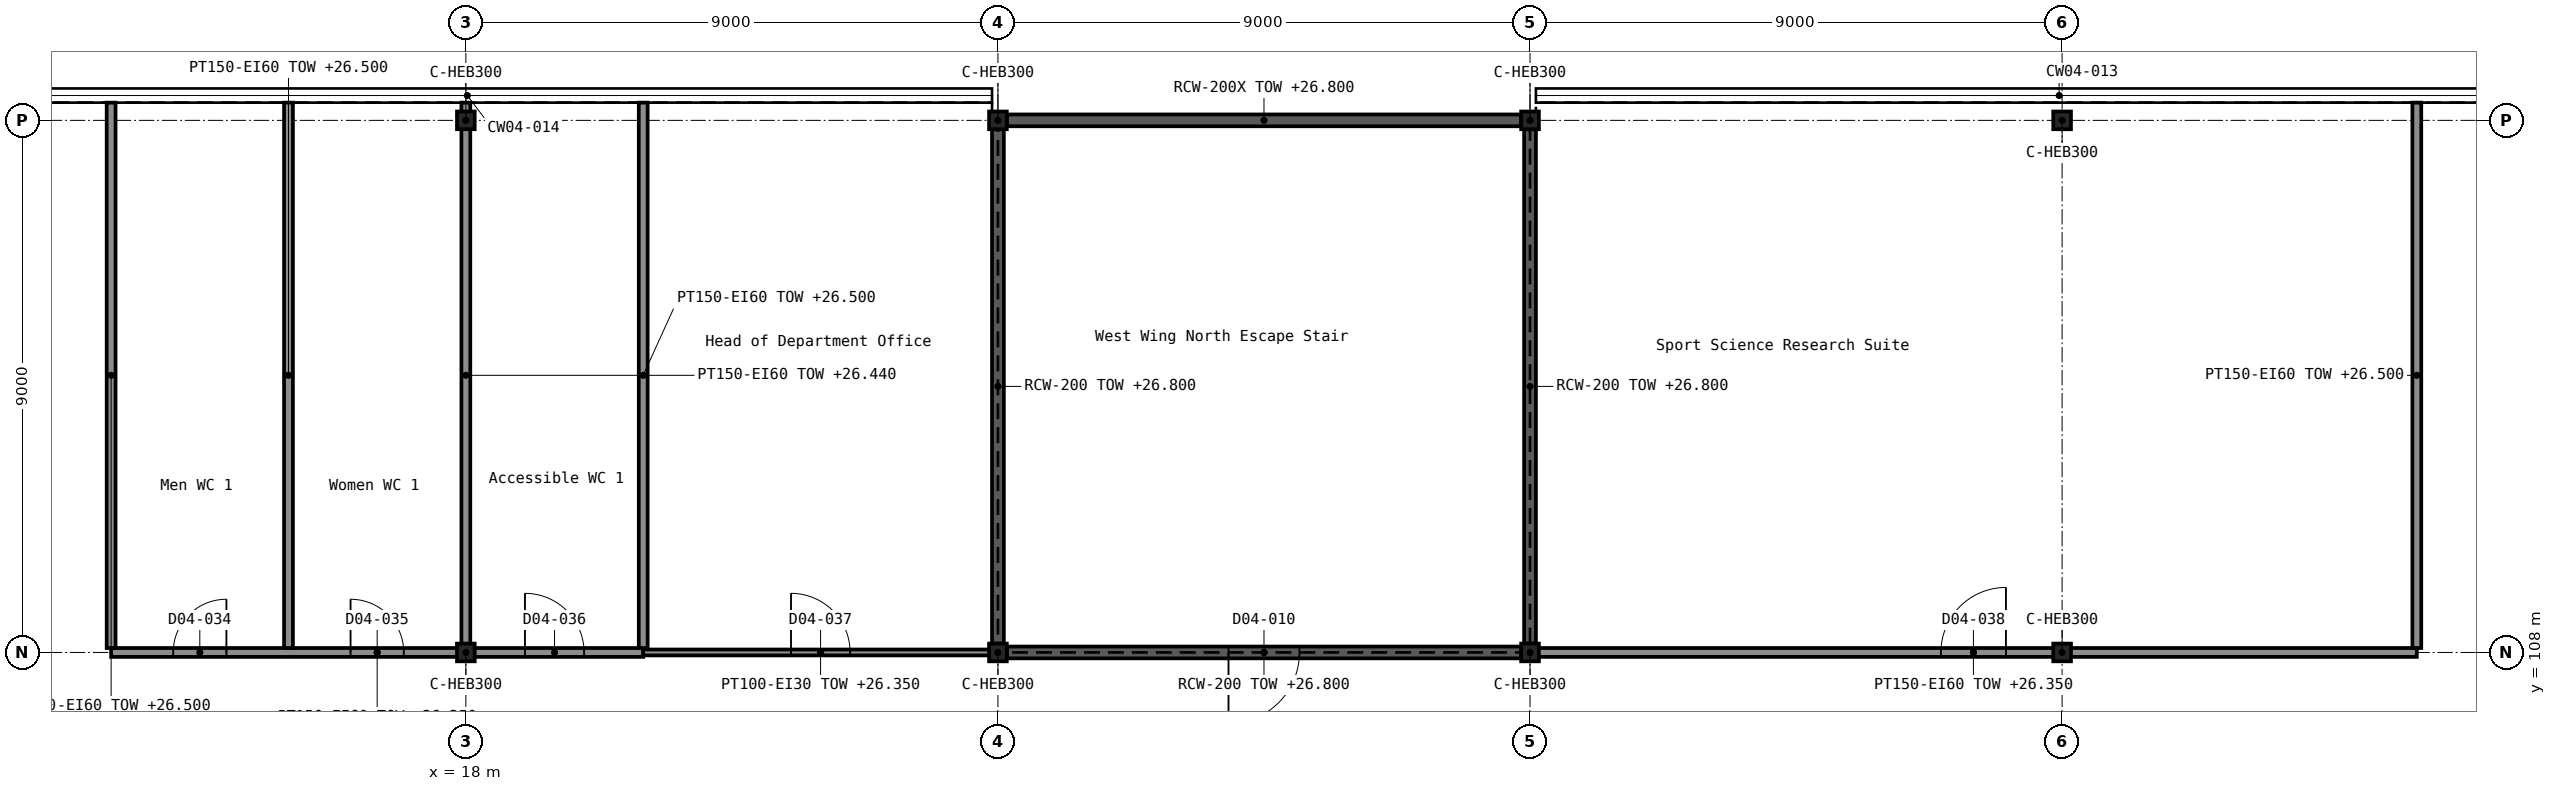
"""IFC4 building model, lengths in metres.
Left out: names, types, materials, properties, quantities, classifications, styles, units other than length and angle.
Written with IfcOpenShell. Run it as: python <this file> out.ifc"""

import sys

from ifc_helpers import new_model, si_unit, direction, frame, frame_2d, origin, origin_2d, place, context, subcontext, project, spatial, rectangle, i_section, extrude, element, fill, save


model = new_model("IFC4")
c1 = context("Model", 3, precision=1e-05, world=origin(), true_north=direction((0.0, 1.0)))
c2 = subcontext(c1, "Body", "Model", "MODEL_VIEW")
j1 = project(units=[si_unit("LENGTHUNIT", "METRE"), si_unit("PLANEANGLEUNIT", "RADIAN")], contexts=[c1])
p1 = place(None, origin())
s1 = spatial("IfcSite", under=j1, at=p1, CompositionType="ELEMENT")
p2 = place(p1, origin())
s2 = spatial("IfcBuilding", under=s1, at=p2, CompositionType="ELEMENT")
p3 = place(p2, frame((0.0, 0.0, 21.6)))
s3 = spatial("IfcBuildingStorey", under=s2, at=p3, CompositionType="ELEMENT", Elevation=21.6)
for number, where, z_axis, x_axis in (
    (1, (18.0, 108.0, 0.0), (0.0, 0.0, 1.0), (1.0, 0.0, 0.0)),
    (2, (27.0, 108.0, 0.0), (0.0, 0.0, 1.0), (1.0, 0.0, 0.0)),
    (3, (36.0, 108.0, 0.0), (0.0, 0.0, 1.0), (1.0, 0.0, 0.0)),
    (4, (45.0, 108.0, 0.0), (0.0, 0.0, 1.0), (1.0, 0.0, 0.0)),
    (5, (18.0, 117.0, 0.0), (0.0, 0.0, 1.0), (1.0, 0.0, 0.0)),
    (6, (27.0, 117.0, 0.0), (0.0, 0.0, 1.0), (1.0, 0.0, 0.0)),
    (7, (36.0, 117.0, 0.0), (0.0, 0.0, 1.0), (1.0, 0.0, 0.0)),
    (8, (45.0, 117.0, 0.0), (0.0, 0.0, 1.0), (1.0, 0.0, 0.0)),
):
    element("IfcColumn", number, at=place(p3, frame(where, z_axis=z_axis, x_axis=x_axis)), inside=s3, PredefinedType="COLUMN", context=c2, shape_type="SweptSolid", body=[
        extrude(i_section(OverallWidth=0.3, OverallDepth=0.3, WebThickness=0.011, FlangeThickness=0.019, FilletRadius=0.027, at=origin_2d()), origin(), (0.0, 0.0, 1.0), 5.4),
    ])
p4 = place(p3, frame((27.15, 108.0, 0.0), z_axis=(0.0, 0.0, 1.0), x_axis=(1.0, 0.0, 0.0)))
e9 = element("IfcWall", 9, at=p4, inside=s3, PredefinedType="SHEAR", context=c2, shape_type="SweptSolid", body=[
    extrude(rectangle(XDim=8.7, YDim=0.2, at=frame_2d((4.35, 0.0))), origin(), (0.0, 0.0, 1.0), 5.2),
])
p5 = place(p4, frame((3.75, 0.0, 0.0)))
e10 = element("IfcOpeningElement", 10, at=p5, cuts=e9, PredefinedType="OPENING", context=c2, shape_type="SweptSolid", body=[
    extrude(rectangle(XDim=1.2, YDim=2.1, at=frame_2d((0.6, 1.05))), frame((0.0, 0.111, 0.0), z_axis=(0.0, -1.0, 0.0), x_axis=(1.0, 0.0, 0.0)), (0.0, 0.0, 1.0), 0.222),
])
for number, where, z_axis, x_axis in (
    (11, (27.15, 117.0, 0.0), (0.0, 0.0, 1.0), (1.0, 0.0, 0.0)),
    (12, (27.0, 108.15, 0.0), (0.0, 0.0, 1.0), (0.0, 1.0, 0.0)),
    (13, (36.0, 108.15, 0.0), (0.0, 0.0, 1.0), (0.0, 1.0, 0.0)),
):
    element("IfcWall", number, at=place(p3, frame(where, z_axis=z_axis, x_axis=x_axis)), inside=s3, PredefinedType="SHEAR", context=c2, shape_type="SweptSolid", body=[
        extrude(rectangle(XDim=8.7, YDim=0.2, at=frame_2d((4.35, 0.0))), origin(), (0.0, 0.0, 1.0), 5.2),
    ])
p6 = place(p3, frame((12.0, 108.0, 0.0), z_axis=(0.0, 0.0, 1.0), x_axis=(1.0, 0.0, 0.0)))
e14 = element("IfcWall", 14, at=p6, inside=s3, PredefinedType="PARTITIONING", context=c2, shape_type="SweptSolid", body=[
    extrude(rectangle(XDim=9.0, YDim=0.15, at=frame_2d((4.5, 0.0))), origin(), (0.0, 0.0, 1.0), 4.75),
])
p7 = place(p6, frame((1.05, 0.0, 0.0)))
e15 = element("IfcOpeningElement", 15, at=p7, cuts=e14, PredefinedType="OPENING", context=c2, shape_type="SweptSolid", body=[
    extrude(rectangle(XDim=0.9, YDim=2.1, at=frame_2d((0.45, 1.05))), frame((0.0, 0.086, 0.0), z_axis=(0.0, -1.0, 0.0), x_axis=(1.0, 0.0, 0.0)), (0.0, 0.0, 1.0), 0.172),
])
p8 = place(p6, frame((4.05, 0.0, 0.0)))
e16 = element("IfcOpeningElement", 16, at=p8, cuts=e14, PredefinedType="OPENING", context=c2, shape_type="SweptSolid", body=[
    extrude(rectangle(XDim=0.9, YDim=2.1, at=frame_2d((0.45, 1.05))), frame((0.0, 0.086, 0.0), z_axis=(0.0, -1.0, 0.0), x_axis=(1.0, 0.0, 0.0)), (0.0, 0.0, 1.0), 0.172),
])
p9 = place(p6, frame((7.0, 0.0, 0.0)))
e17 = element("IfcOpeningElement", 17, at=p9, cuts=e14, PredefinedType="OPENING", context=c2, shape_type="SweptSolid", body=[
    extrude(rectangle(XDim=1.0, YDim=2.1, at=frame_2d((0.5, 1.05))), frame((0.0, 0.086, 0.0), z_axis=(0.0, -1.0, 0.0), x_axis=(1.0, 0.0, 0.0)), (0.0, 0.0, 1.0), 0.172),
])
p10 = place(p3, frame((36.0, 108.0, 0.0), z_axis=(0.0, 0.0, 1.0), x_axis=(1.0, 0.0, 0.0)))
e18 = element("IfcWall", 18, at=p10, inside=s3, PredefinedType="PARTITIONING", context=c2, shape_type="SweptSolid", body=[
    extrude(rectangle(XDim=15.0, YDim=0.15, at=frame_2d((7.5, 0.0))), origin(), (0.0, 0.0, 1.0), 4.75),
])
p11 = place(p10, frame((6.95, 0.0, 0.0)))
e19 = element("IfcOpeningElement", 19, at=p11, cuts=e18, PredefinedType="OPENING", context=c2, shape_type="SweptSolid", body=[
    extrude(rectangle(XDim=1.1, YDim=2.1, at=frame_2d((0.55, 1.05))), frame((0.0, 0.086, 0.0), z_axis=(0.0, -1.0, 0.0), x_axis=(1.0, 0.0, 0.0)), (0.0, 0.0, 1.0), 0.172),
])
for number, where, z_axis, x_axis in (
    (20, (12.0, 108.075, 0.0), (0.0, 0.0, 1.0), (0.0, 1.0, 0.0)),
    (21, (15.0, 108.075, 0.0), (0.0, 0.0, 1.0), (0.0, 1.0, 0.0)),
):
    element("IfcWall", number, at=place(p3, frame(where, z_axis=z_axis, x_axis=x_axis)), inside=s3, PredefinedType="PARTITIONING", context=c2, shape_type="SweptSolid", body=[
        extrude(rectangle(XDim=9.225, YDim=0.15, at=frame_2d((4.613, 0.0))), origin(), (0.0, 0.0, 1.0), 4.9),
    ])
p12 = place(p3, frame((18.0, 108.075, 0.0), z_axis=(0.0, 0.0, 1.0), x_axis=(0.0, 1.0, 0.0)))
e22 = element("IfcWall", 22, at=p12, inside=s3, PredefinedType="PARTITIONING", context=c2, shape_type="SweptSolid", body=[
    extrude(rectangle(XDim=9.225, YDim=0.15, at=frame_2d((4.613, 0.0))), origin(), (0.0, 0.0, 1.0), 4.84),
])
for number, where, z_axis, x_axis in (
    (23, (21.0, 108.075, 0.0), (0.0, 0.0, 1.0), (0.0, 1.0, 0.0)),
    (24, (51.0, 108.075, 0.0), (0.0, 0.0, 1.0), (0.0, 1.0, 0.0)),
):
    element("IfcWall", number, at=place(p3, frame(where, z_axis=z_axis, x_axis=x_axis)), inside=s3, PredefinedType="PARTITIONING", context=c2, shape_type="SweptSolid", body=[
        extrude(rectangle(XDim=9.225, YDim=0.15, at=frame_2d((4.613, 0.0))), origin(), (0.0, 0.0, 1.0), 4.9),
    ])
p13 = place(p3, frame((21.0, 108.0, 0.0), z_axis=(0.0, 0.0, 1.0), x_axis=(1.0, 0.0, 0.0)))
e25 = element("IfcWall", 25, at=p13, inside=s3, PredefinedType="PARTITIONING", context=c2, shape_type="SweptSolid", body=[
    extrude(rectangle(XDim=6.0, YDim=0.1, at=frame_2d((3.0, 0.0))), origin(), (0.0, 0.0, 1.0), 4.75),
])
p14 = place(p13, frame((2.5, 0.0, 0.0)))
e26 = element("IfcOpeningElement", 26, at=p14, cuts=e25, PredefinedType="OPENING", context=c2, shape_type="SweptSolid", body=[
    extrude(rectangle(XDim=1.0, YDim=2.1, at=frame_2d((0.5, 1.05))), frame((0.0, 0.061, 0.0), z_axis=(0.0, -1.0, 0.0), x_axis=(1.0, 0.0, 0.0)), (0.0, 0.0, 1.0), 0.122),
])
p15 = place(p5, frame((1.2, 0.0, 0.0), z_axis=(0.0, 0.0, 1.0), x_axis=(-1.0, 0.0, 0.0)))
e27 = element("IfcDoor", 27, at=p15, inside=s3, OperationType="SINGLE_SWING_RIGHT", PredefinedType="DOOR", context=c2, shape_type="SweptSolid", body=[
    extrude(rectangle(XDim=1.2, YDim=2.1, at=frame_2d((0.6, 1.05))), frame((0.0, 0.025, 0.0), z_axis=(0.0, -1.0, 0.0), x_axis=(1.0, 0.0, 0.0)), (0.0, 0.0, 1.0), 0.05),
])
fill(e10, e27)
p16 = place(p7, origin())
e28 = element("IfcDoor", 28, at=p16, inside=s3, OperationType="SINGLE_SWING_RIGHT", PredefinedType="DOOR", context=c2, shape_type="SweptSolid", body=[
    extrude(rectangle(XDim=0.9, YDim=2.1, at=frame_2d((0.45, 1.05))), frame((0.0, 0.025, 0.0), z_axis=(0.0, -1.0, 0.0), x_axis=(1.0, 0.0, 0.0)), (0.0, 0.0, 1.0), 0.05),
])
fill(e15, e28)
p17 = place(p8, origin())
e29 = element("IfcDoor", 29, at=p17, inside=s3, OperationType="SINGLE_SWING_LEFT", PredefinedType="DOOR", context=c2, shape_type="SweptSolid", body=[
    extrude(rectangle(XDim=0.9, YDim=2.1, at=frame_2d((0.45, 1.05))), frame((0.0, 0.025, 0.0), z_axis=(0.0, -1.0, 0.0), x_axis=(1.0, 0.0, 0.0)), (0.0, 0.0, 1.0), 0.05),
])
fill(e16, e29)
p18 = place(p9, origin())
e30 = element("IfcDoor", 30, at=p18, inside=s3, OperationType="SINGLE_SWING_LEFT", PredefinedType="DOOR", context=c2, shape_type="SweptSolid", body=[
    extrude(rectangle(XDim=1.0, YDim=2.1, at=frame_2d((0.5, 1.05))), frame((0.0, 0.025, 0.0), z_axis=(0.0, -1.0, 0.0), x_axis=(1.0, 0.0, 0.0)), (0.0, 0.0, 1.0), 0.05),
])
fill(e17, e30)
p19 = place(p14, origin())
e31 = element("IfcDoor", 31, at=p19, inside=s3, OperationType="SINGLE_SWING_LEFT", PredefinedType="DOOR", context=c2, shape_type="SweptSolid", body=[
    extrude(rectangle(XDim=1.0, YDim=2.1, at=frame_2d((0.5, 1.05))), frame((0.0, 0.025, 0.0), z_axis=(0.0, -1.0, 0.0), x_axis=(1.0, 0.0, 0.0)), (0.0, 0.0, 1.0), 0.05),
])
fill(e26, e31)
p20 = place(p11, origin())
e32 = element("IfcDoor", 32, at=p20, inside=s3, OperationType="SINGLE_SWING_RIGHT", PredefinedType="DOOR", context=c2, shape_type="SweptSolid", body=[
    extrude(rectangle(XDim=1.1, YDim=2.1, at=frame_2d((0.55, 1.05))), frame((0.0, 0.025, 0.0), z_axis=(0.0, -1.0, 0.0), x_axis=(1.0, 0.0, 0.0)), (0.0, 0.0, 1.0), 0.05),
])
fill(e19, e32)
save(model, sys.argv[1])
